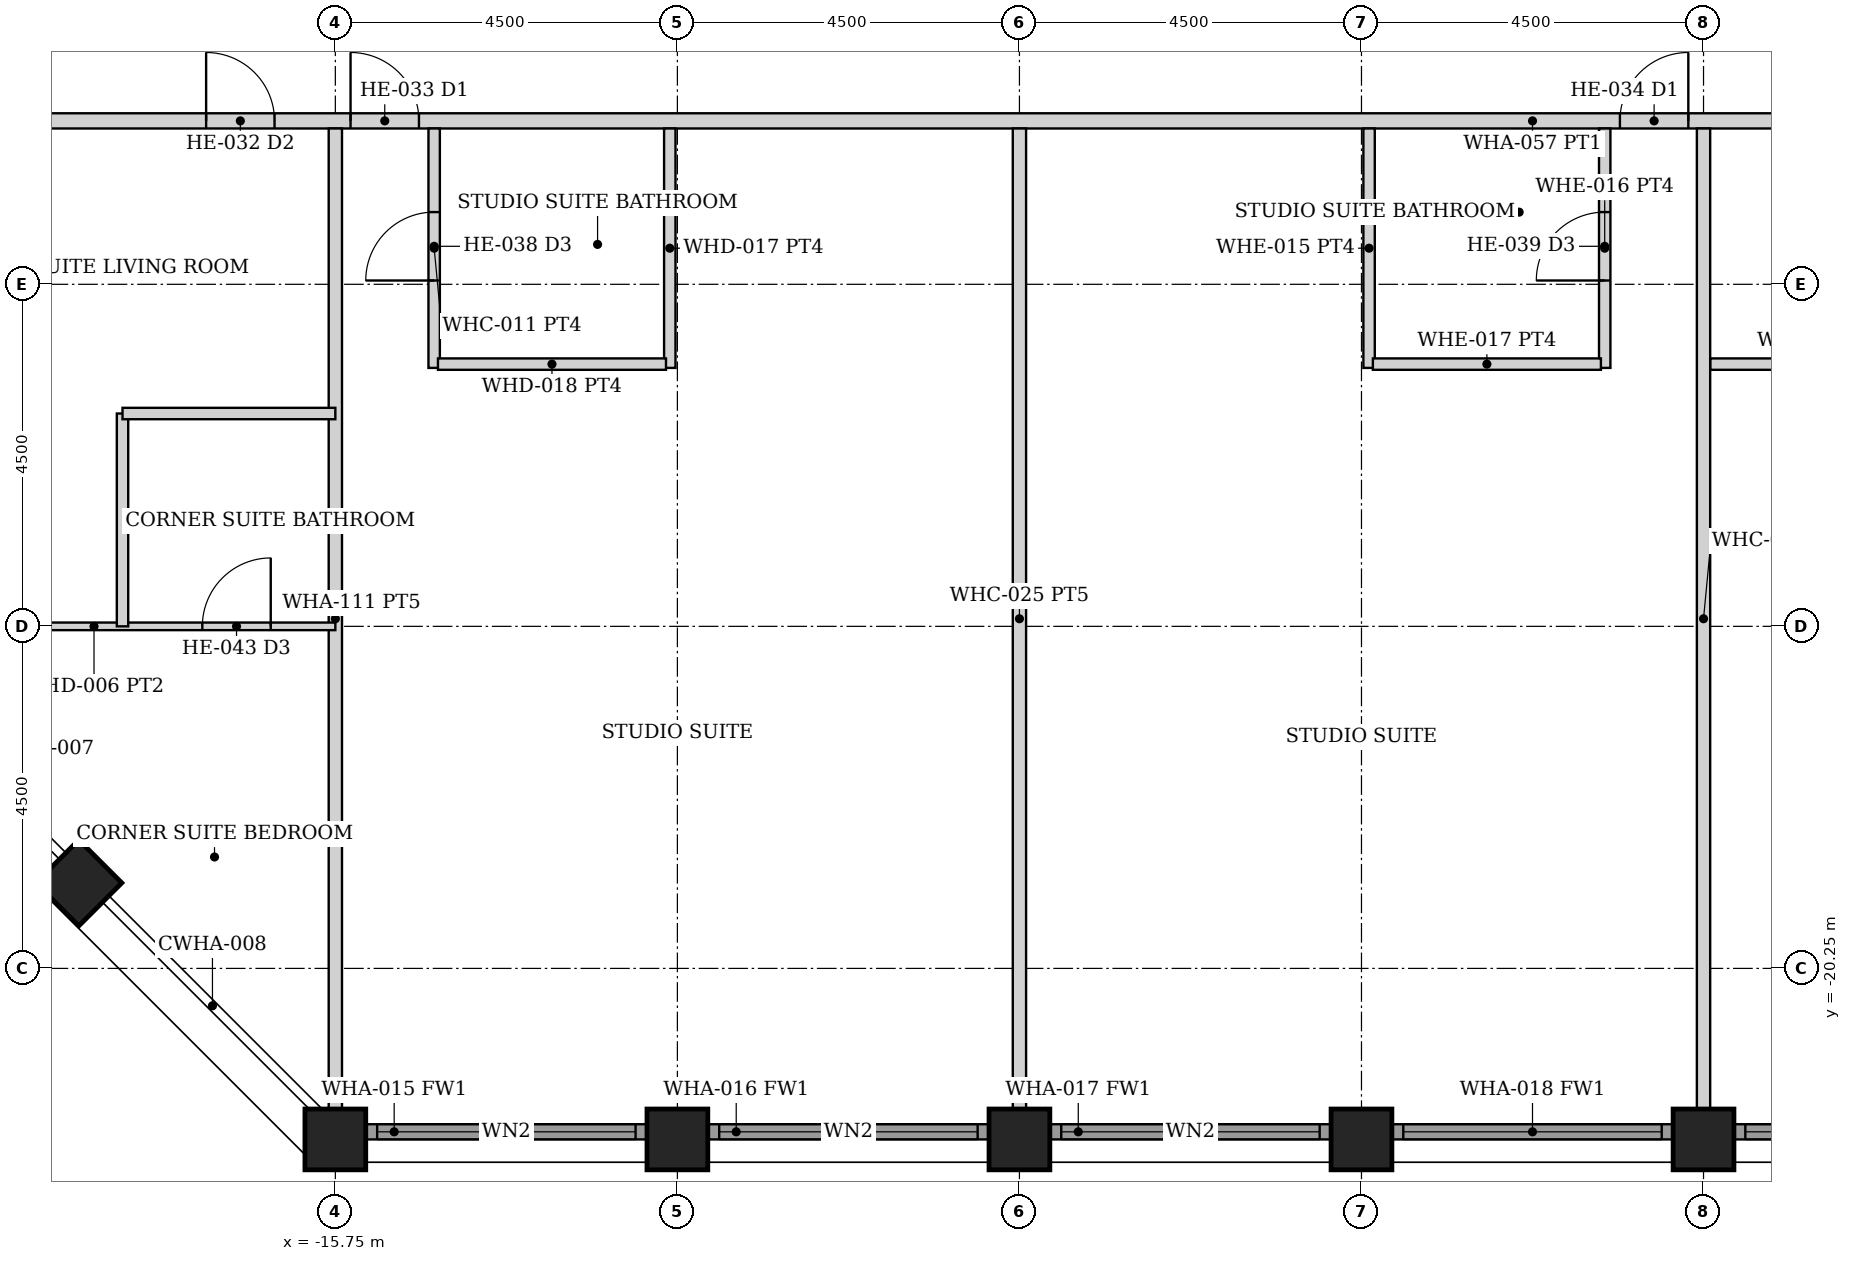
"""IFC4 building model, lengths in metres.
Left out: names, types, materials, properties, quantities, classifications, styles, units other than length and angle.
Written with IfcOpenShell. Run it as: python <this file> out.ifc"""

import sys

from ifc_helpers import new_model, si_unit, direction, frame, frame_2d, origin, origin_2d, place, context, subcontext, project, spatial, rectangle, hollow_rectangle, extrude, element, fill, save


model = new_model("IFC4")
c1 = context("Model", 3, precision=1e-05, world=origin(), true_north=direction((0.0, 1.0)))
c2 = subcontext(c1, "Body", "Model", "MODEL_VIEW")
j1 = project(units=[si_unit("LENGTHUNIT", "METRE"), si_unit("PLANEANGLEUNIT", "RADIAN")], contexts=[c1])
p1 = place(None, origin())
s1 = spatial("IfcSite", under=j1, at=p1, CompositionType="ELEMENT")
p2 = place(p1, origin())
s2 = spatial("IfcBuilding", under=s1, at=p2, CompositionType="ELEMENT")
p3 = place(p2, frame((0.0, 0.0, 161.6)))
s3 = spatial("IfcBuildingStorey", under=s2, at=p3, CompositionType="ELEMENT", Elevation=161.6)
for number, where, z_axis, x_axis in (
    (1, (-15.75, -22.5, 0.0), (0.0, 0.0, 1.0), (0.0, 1.0, 0.0)),
    (2, (-11.25, -22.5, 0.0), (0.0, 0.0, 1.0), (0.0, 1.0, 0.0)),
    (3, (-6.75, -22.5, 0.0), (0.0, 0.0, 1.0), (0.0, 1.0, 0.0)),
    (4, (-2.25, -22.5, 0.0), (0.0, 0.0, 1.0), (0.0, 1.0, 0.0)),
    (5, (2.25, -22.5, 0.0), (0.0, 0.0, 1.0), (0.0, 1.0, 0.0)),
    (6, (-19.125, -19.125, 0.0), (0.0, 0.0, 1.0), (0.707, 0.707, 0.0)),
):
    element("IfcColumn", number, at=place(p3, frame(where, z_axis=z_axis, x_axis=x_axis)), inside=s3, PredefinedType="COLUMN", context=c2, shape_type="SweptSolid", body=[
        extrude(hollow_rectangle(XDim=0.8, YDim=0.8, WallThickness=0.05, at=origin_2d()), origin(), (0.0, 0.0, 1.0), 3.6),
    ])
p4 = place(p3, frame((-15.345, -22.4, 0.0), z_axis=(0.0, 0.0, 1.0), x_axis=(1.0, 0.0, 0.0)))
e7 = element("IfcWall", 7, at=p4, inside=s3, PredefinedType="SOLIDWALL", context=c2, shape_type="SweptSolid", body=[
    extrude(rectangle(XDim=3.69, YDim=0.2, at=frame_2d((1.845, 0.0))), origin(), (0.0, 0.0, 1.0), 2.479),
])
p5 = place(p4, frame((0.145, 0.0, 0.3)))
e8 = element("IfcOpeningElement", 8, at=p5, cuts=e7, PredefinedType="OPENING", context=c2, shape_type="SweptSolid", body=[
    extrude(rectangle(XDim=3.4, YDim=2.029, at=frame_2d((1.7, 1.015))), frame((0.0, 0.11, 0.0), z_axis=(0.0, -1.0, 0.0), x_axis=(1.0, 0.0, 0.0)), (0.0, 0.0, 1.0), 0.22),
])
p6 = place(p3, frame((-10.845, -22.4, 0.0), z_axis=(0.0, 0.0, 1.0), x_axis=(1.0, 0.0, 0.0)))
e9 = element("IfcWall", 9, at=p6, inside=s3, PredefinedType="SOLIDWALL", context=c2, shape_type="SweptSolid", body=[
    extrude(rectangle(XDim=3.69, YDim=0.2, at=frame_2d((1.845, 0.0))), origin(), (0.0, 0.0, 1.0), 2.479),
])
p7 = place(p6, frame((0.145, 0.0, 0.3)))
e10 = element("IfcOpeningElement", 10, at=p7, cuts=e9, PredefinedType="OPENING", context=c2, shape_type="SweptSolid", body=[
    extrude(rectangle(XDim=3.4, YDim=2.029, at=frame_2d((1.7, 1.015))), frame((0.0, 0.11, 0.0), z_axis=(0.0, -1.0, 0.0), x_axis=(1.0, 0.0, 0.0)), (0.0, 0.0, 1.0), 0.22),
])
p8 = place(p3, frame((-6.345, -22.4, 0.0), z_axis=(0.0, 0.0, 1.0), x_axis=(1.0, 0.0, 0.0)))
e11 = element("IfcWall", 11, at=p8, inside=s3, PredefinedType="SOLIDWALL", context=c2, shape_type="SweptSolid", body=[
    extrude(rectangle(XDim=3.69, YDim=0.2, at=frame_2d((1.845, 0.0))), origin(), (0.0, 0.0, 1.0), 2.479),
])
p9 = place(p8, frame((0.145, 0.0, 0.3)))
e12 = element("IfcOpeningElement", 12, at=p9, cuts=e11, PredefinedType="OPENING", context=c2, shape_type="SweptSolid", body=[
    extrude(rectangle(XDim=3.4, YDim=2.029, at=frame_2d((1.7, 1.015))), frame((0.0, 0.11, 0.0), z_axis=(0.0, -1.0, 0.0), x_axis=(1.0, 0.0, 0.0)), (0.0, 0.0, 1.0), 0.22),
])
p10 = place(p3, frame((-1.845, -22.4, 0.0), z_axis=(0.0, 0.0, 1.0), x_axis=(1.0, 0.0, 0.0)))
e13 = element("IfcWall", 13, at=p10, inside=s3, PredefinedType="SOLIDWALL", context=c2, shape_type="SweptSolid", body=[
    extrude(rectangle(XDim=3.69, YDim=0.2, at=frame_2d((1.845, 0.0))), origin(), (0.0, 0.0, 1.0), 2.479),
])
p11 = place(p10, frame((0.145, 0.0, 0.3)))
e14 = element("IfcOpeningElement", 14, at=p11, cuts=e13, PredefinedType="OPENING", context=c2, shape_type="SweptSolid", body=[
    extrude(rectangle(XDim=3.4, YDim=2.029, at=frame_2d((1.7, 1.015))), frame((0.0, 0.11, 0.0), z_axis=(0.0, -1.0, 0.0), x_axis=(1.0, 0.0, 0.0)), (0.0, 0.0, 1.0), 0.22),
])
p12 = place(p3, frame((2.655, -22.4, 0.0), z_axis=(0.0, 0.0, 1.0), x_axis=(1.0, 0.0, 0.0)))
e15 = element("IfcWall", 15, at=p12, inside=s3, PredefinedType="SOLIDWALL", context=c2, shape_type="SweptSolid", body=[
    extrude(rectangle(XDim=3.69, YDim=0.2, at=frame_2d((1.845, 0.0))), origin(), (0.0, 0.0, 1.0), 2.479),
])
p13 = place(p12, frame((0.145, 0.0, 0.3)))
e16 = element("IfcOpeningElement", 16, at=p13, cuts=e15, PredefinedType="OPENING", context=c2, shape_type="SweptSolid", body=[
    extrude(rectangle(XDim=3.4, YDim=2.029, at=frame_2d((1.7, 1.015))), frame((0.0, 0.11, 0.0), z_axis=(0.0, -1.0, 0.0), x_axis=(1.0, 0.0, 0.0)), (0.0, 0.0, 1.0), 0.22),
])
p14 = place(p3, frame((-22.3, -9.1, 0.0), z_axis=(0.0, 0.0, 1.0), x_axis=(1.0, 0.0, 0.0)))
e17 = element("IfcWall", 17, at=p14, inside=s3, PredefinedType="PARTITIONING", context=c2, shape_type="SweptSolid", body=[
    extrude(rectangle(XDim=44.6, YDim=0.2, at=frame_2d((22.3, 0.0))), origin(), (0.0, 0.0, 1.0), 2.473),
])
p15 = place(p14, frame((6.75, 0.0, 0.0)))
e18 = element("IfcOpeningElement", 18, at=p15, cuts=e17, PredefinedType="OPENING", context=c2, shape_type="SweptSolid", body=[
    extrude(rectangle(XDim=0.9, YDim=2.1, at=frame_2d((0.45, 1.05))), frame((0.0, 0.11, 0.0), z_axis=(0.0, -1.0, 0.0), x_axis=(1.0, 0.0, 0.0)), (0.0, 0.0, 1.0), 0.22),
])
p16 = place(p14, frame((23.45, 0.0, 0.0)))
e19 = element("IfcOpeningElement", 19, at=p16, cuts=e17, PredefinedType="OPENING", context=c2, shape_type="SweptSolid", body=[
    extrude(rectangle(XDim=0.9, YDim=2.1, at=frame_2d((0.45, 1.05))), frame((0.0, 0.11, 0.0), z_axis=(0.0, -1.0, 0.0), x_axis=(1.0, 0.0, 0.0)), (0.0, 0.0, 1.0), 0.22),
])
p17 = place(p14, frame((27.95, 0.0, 0.0)))
e20 = element("IfcOpeningElement", 20, at=p17, cuts=e17, PredefinedType="OPENING", context=c2, shape_type="SweptSolid", body=[
    extrude(rectangle(XDim=0.9, YDim=2.1, at=frame_2d((0.45, 1.05))), frame((0.0, 0.11, 0.0), z_axis=(0.0, -1.0, 0.0), x_axis=(1.0, 0.0, 0.0)), (0.0, 0.0, 1.0), 0.22),
])
p18 = place(p14, frame((36.95, 0.0, 0.0)))
e21 = element("IfcOpeningElement", 21, at=p18, cuts=e17, PredefinedType="OPENING", context=c2, shape_type="SweptSolid", body=[
    extrude(rectangle(XDim=0.9, YDim=2.1, at=frame_2d((0.45, 1.05))), frame((0.0, 0.11, 0.0), z_axis=(0.0, -1.0, 0.0), x_axis=(1.0, 0.0, 0.0)), (0.0, 0.0, 1.0), 0.22),
])
p19 = place(p14, frame((38.85, 0.0, 0.0)))
e22 = element("IfcOpeningElement", 22, at=p19, cuts=e17, PredefinedType="OPENING", context=c2, shape_type="SweptSolid", body=[
    extrude(rectangle(XDim=0.9, YDim=2.1, at=frame_2d((0.45, 1.05))), frame((0.0, 0.11, 0.0), z_axis=(0.0, -1.0, 0.0), x_axis=(1.0, 0.0, 0.0)), (0.0, 0.0, 1.0), 0.22),
])
p20 = place(p14, frame((4.85, 0.0, 0.0)))
e23 = element("IfcOpeningElement", 23, at=p20, cuts=e17, PredefinedType="OPENING", context=c2, shape_type="SweptSolid", body=[
    extrude(rectangle(XDim=0.9, YDim=2.1, at=frame_2d((0.45, 1.05))), frame((0.0, 0.11, 0.0), z_axis=(0.0, -1.0, 0.0), x_axis=(1.0, 0.0, 0.0)), (0.0, 0.0, 1.0), 0.22),
])
p21 = place(p3, frame((-14.45, -12.35, 0.0), z_axis=(0.0, 0.0, 1.0), x_axis=(0.0, 1.0, 0.0)))
e24 = element("IfcWall", 24, at=p21, inside=s3, PredefinedType="PARTITIONING", context=c2, shape_type="SweptSolid", body=[
    extrude(rectangle(XDim=3.15, YDim=0.15, at=frame_2d((1.575, 0.0))), origin(), (0.0, 0.0, 1.0), 2.473),
])
p22 = place(p21, frame((1.15, 0.0, 0.0)))
e25 = element("IfcOpeningElement", 25, at=p22, cuts=e24, PredefinedType="OPENING", context=c2, shape_type="SweptSolid", body=[
    extrude(rectangle(XDim=0.9, YDim=2.1, at=frame_2d((0.45, 1.05))), frame((0.0, 0.085, 0.0), z_axis=(0.0, -1.0, 0.0), x_axis=(1.0, 0.0, 0.0)), (0.0, 0.0, 1.0), 0.17),
])
p23 = place(p3, frame((-11.35, -12.35, 0.0), z_axis=(0.0, 0.0, 1.0), x_axis=(0.0, 1.0, 0.0)))
e26 = element("IfcWall", 26, at=p23, inside=s3, PredefinedType="PARTITIONING", context=c2, shape_type="SweptSolid", body=[
    extrude(rectangle(XDim=3.15, YDim=0.15, at=frame_2d((1.575, 0.0))), origin(), (0.0, 0.0, 1.0), 2.473),
])
p24 = place(p3, frame((-14.4, -12.3, 0.0), z_axis=(0.0, 0.0, 1.0), x_axis=(1.0, 0.0, 0.0)))
e27 = element("IfcWall", 27, at=p24, inside=s3, PredefinedType="PARTITIONING", context=c2, shape_type="SweptSolid", body=[
    extrude(rectangle(XDim=3.0, YDim=0.15, at=frame_2d((1.5, 0.0))), origin(), (0.0, 0.0, 1.0), 2.473),
])
p25 = place(p3, frame((0.95, -12.35, 0.0), z_axis=(0.0, 0.0, 1.0), x_axis=(0.0, 1.0, 0.0)))
e28 = element("IfcWall", 28, at=p25, inside=s3, PredefinedType="PARTITIONING", context=c2, shape_type="SweptSolid", body=[
    extrude(rectangle(XDim=3.15, YDim=0.15, at=frame_2d((1.575, 0.0))), origin(), (0.0, 0.0, 1.0), 2.473),
])
p26 = place(p25, frame((1.15, 0.0, 0.0)))
e29 = element("IfcOpeningElement", 29, at=p26, cuts=e28, PredefinedType="OPENING", context=c2, shape_type="SweptSolid", body=[
    extrude(rectangle(XDim=0.9, YDim=2.1, at=frame_2d((0.45, 1.05))), frame((0.0, 0.085, 0.0), z_axis=(0.0, -1.0, 0.0), x_axis=(1.0, 0.0, 0.0)), (0.0, 0.0, 1.0), 0.17),
])
p27 = place(p3, frame((-2.15, -12.35, 0.0), z_axis=(0.0, 0.0, 1.0), x_axis=(0.0, 1.0, 0.0)))
e30 = element("IfcWall", 30, at=p27, inside=s3, PredefinedType="PARTITIONING", context=c2, shape_type="SweptSolid", body=[
    extrude(rectangle(XDim=3.15, YDim=0.15, at=frame_2d((1.575, 0.0))), origin(), (0.0, 0.0, 1.0), 2.473),
])
p28 = place(p3, frame((-2.1, -12.3, 0.0), z_axis=(0.0, 0.0, 1.0), x_axis=(1.0, 0.0, 0.0)))
e31 = element("IfcWall", 31, at=p28, inside=s3, PredefinedType="PARTITIONING", context=c2, shape_type="SweptSolid", body=[
    extrude(rectangle(XDim=3.0, YDim=0.15, at=frame_2d((1.5, 0.0))), origin(), (0.0, 0.0, 1.0), 2.473),
])
p29 = place(p3, frame((2.337, -12.3, 0.0), z_axis=(0.0, 0.0, 1.0), x_axis=(1.0, 0.0, 0.0)))
e32 = element("IfcWall", 32, at=p29, inside=s3, PredefinedType="PARTITIONING", context=c2, shape_type="SweptSolid", body=[
    extrude(rectangle(XDim=3.062, YDim=0.15, at=frame_2d((1.531, 0.0))), origin(), (0.0, 0.0, 1.0), 2.473),
])
for number, where, z_axis, x_axis in (
    (33, (-15.75, -22.1, 0.0), (0.0, 0.0, 1.0), (0.0, 1.0, 0.0)),
    (34, (-6.75, -22.1, 0.0), (0.0, 0.0, 1.0), (0.0, 1.0, 0.0)),
    (35, (2.25, -22.1, 0.0), (0.0, 0.0, 1.0), (0.0, 1.0, 0.0)),
):
    element("IfcWall", number, at=place(p3, frame(where, z_axis=z_axis, x_axis=x_axis)), inside=s3, PredefinedType="PARTITIONING", context=c2, shape_type="SweptSolid", body=[
        extrude(rectangle(XDim=12.9, YDim=0.175, at=frame_2d((6.45, 0.0))), origin(), (0.0, 0.0, 1.0), 2.473),
    ])
p30 = place(p3, frame((-22.1, -15.75, 0.0), z_axis=(0.0, 0.0, 1.0), x_axis=(1.0, 0.0, 0.0)))
e36 = element("IfcWall", 36, at=p30, inside=s3, PredefinedType="PARTITIONING", context=c2, shape_type="SweptSolid", body=[
    extrude(rectangle(XDim=6.35, YDim=0.1, at=frame_2d((3.175, 0.0))), origin(), (0.0, 0.0, 1.0), 2.473),
])
p31 = place(p30, frame((1.375, 0.0, 0.0)))
e37 = element("IfcOpeningElement", 37, at=p31, cuts=e36, PredefinedType="OPENING", context=c2, shape_type="SweptSolid", body=[
    extrude(rectangle(XDim=0.85, YDim=2.1, at=frame_2d((0.425, 1.05))), frame((0.0, 0.06, 0.0), z_axis=(0.0, -1.0, 0.0), x_axis=(1.0, 0.0, 0.0)), (0.0, 0.0, 1.0), 0.12),
])
p32 = place(p30, frame((4.6, 0.0, 0.0)))
e38 = element("IfcOpeningElement", 38, at=p32, cuts=e36, PredefinedType="OPENING", context=c2, shape_type="SweptSolid", body=[
    extrude(rectangle(XDim=0.9, YDim=2.1, at=frame_2d((0.45, 1.05))), frame((0.0, 0.06, 0.0), z_axis=(0.0, -1.0, 0.0), x_axis=(1.0, 0.0, 0.0)), (0.0, 0.0, 1.0), 0.12),
])
for number, where, z_axis, x_axis in (
    (39, (-18.55, -15.75, 0.0), (0.0, 0.0, 1.0), (0.0, 1.0, 0.0)),
    (40, (-18.55, -12.95, 0.0), (0.0, 0.0, 1.0), (1.0, 0.0, 0.0)),
):
    element("IfcWall", number, at=place(p3, frame(where, z_axis=z_axis, x_axis=x_axis)), inside=s3, PredefinedType="PARTITIONING", context=c2, shape_type="SweptSolid", body=[
        extrude(rectangle(XDim=2.8, YDim=0.15, at=frame_2d((1.4, 0.0))), origin(), (0.0, 0.0, 1.0), 2.473),
    ])
p33 = place(p5, origin())
e41 = element("IfcWindow", 41, at=p33, inside=s3, PartitioningType="SINGLE_PANEL", PredefinedType="WINDOW", context=c2, shape_type="SweptSolid", body=[
    extrude(rectangle(XDim=3.4, YDim=2.029, at=frame_2d((1.7, 1.015))), frame((0.0, 0.03, 0.0), z_axis=(0.0, -1.0, 0.0), x_axis=(1.0, 0.0, 0.0)), (0.0, 0.0, 1.0), 0.06),
])
fill(e8, e41)
p34 = place(p7, origin())
e42 = element("IfcWindow", 42, at=p34, inside=s3, PartitioningType="SINGLE_PANEL", PredefinedType="WINDOW", context=c2, shape_type="SweptSolid", body=[
    extrude(rectangle(XDim=3.4, YDim=2.029, at=frame_2d((1.7, 1.015))), frame((0.0, 0.03, 0.0), z_axis=(0.0, -1.0, 0.0), x_axis=(1.0, 0.0, 0.0)), (0.0, 0.0, 1.0), 0.06),
])
fill(e10, e42)
p35 = place(p9, origin())
e43 = element("IfcWindow", 43, at=p35, inside=s3, PartitioningType="SINGLE_PANEL", PredefinedType="WINDOW", context=c2, shape_type="SweptSolid", body=[
    extrude(rectangle(XDim=3.4, YDim=2.029, at=frame_2d((1.7, 1.015))), frame((0.0, 0.03, 0.0), z_axis=(0.0, -1.0, 0.0), x_axis=(1.0, 0.0, 0.0)), (0.0, 0.0, 1.0), 0.06),
])
fill(e12, e43)
p36 = place(p11, origin())
e44 = element("IfcWindow", 44, at=p36, inside=s3, PartitioningType="SINGLE_PANEL", PredefinedType="WINDOW", context=c2, shape_type="SweptSolid", body=[
    extrude(rectangle(XDim=3.4, YDim=2.029, at=frame_2d((1.7, 1.015))), frame((0.0, 0.03, 0.0), z_axis=(0.0, -1.0, 0.0), x_axis=(1.0, 0.0, 0.0)), (0.0, 0.0, 1.0), 0.06),
])
fill(e14, e44)
p37 = place(p13, origin())
e45 = element("IfcWindow", 45, at=p37, inside=s3, PartitioningType="SINGLE_PANEL", PredefinedType="WINDOW", context=c2, shape_type="SweptSolid", body=[
    extrude(rectangle(XDim=3.4, YDim=2.029, at=frame_2d((1.7, 1.015))), frame((0.0, 0.03, 0.0), z_axis=(0.0, -1.0, 0.0), x_axis=(1.0, 0.0, 0.0)), (0.0, 0.0, 1.0), 0.06),
])
fill(e16, e45)
p38 = place(p15, origin())
e46 = element("IfcDoor", 46, at=p38, inside=s3, OperationType="SINGLE_SWING_LEFT", PredefinedType="DOOR", context=c2, shape_type="SweptSolid", body=[
    extrude(rectangle(XDim=0.9, YDim=2.1, at=frame_2d((0.45, 1.05))), frame((0.0, 0.025, 0.0), z_axis=(0.0, -1.0, 0.0), x_axis=(1.0, 0.0, 0.0)), (0.0, 0.0, 1.0), 0.05),
])
fill(e18, e46)
p39 = place(p22, origin())
e47 = element("IfcDoor", 47, at=p39, inside=s3, OperationType="SINGLE_SWING_LEFT", PredefinedType="DOOR", context=c2, shape_type="SweptSolid", body=[
    extrude(rectangle(XDim=0.9, YDim=2.1, at=frame_2d((0.45, 1.05))), frame((0.0, 0.025, 0.0), z_axis=(0.0, -1.0, 0.0), x_axis=(1.0, 0.0, 0.0)), (0.0, 0.0, 1.0), 0.05),
])
fill(e25, e47)
p40 = place(p16, origin())
e48 = element("IfcDoor", 48, at=p40, inside=s3, OperationType="SINGLE_SWING_RIGHT", PredefinedType="DOOR", context=c2, shape_type="SweptSolid", body=[
    extrude(rectangle(XDim=0.9, YDim=2.1, at=frame_2d((0.45, 1.05))), frame((0.0, 0.025, 0.0), z_axis=(0.0, -1.0, 0.0), x_axis=(1.0, 0.0, 0.0)), (0.0, 0.0, 1.0), 0.05),
])
fill(e19, e48)
p41 = place(p26, origin())
e49 = element("IfcDoor", 49, at=p41, inside=s3, OperationType="SINGLE_SWING_LEFT", PredefinedType="DOOR", context=c2, shape_type="SweptSolid", body=[
    extrude(rectangle(XDim=0.9, YDim=2.1, at=frame_2d((0.45, 1.05))), frame((0.0, 0.025, 0.0), z_axis=(0.0, -1.0, 0.0), x_axis=(1.0, 0.0, 0.0)), (0.0, 0.0, 1.0), 0.05),
])
fill(e29, e49)
p42 = place(p20, origin())
e50 = element("IfcDoor", 50, at=p42, inside=s3, OperationType="SINGLE_SWING_LEFT", PredefinedType="DOOR", context=c2, shape_type="SweptSolid", body=[
    extrude(rectangle(XDim=0.9, YDim=2.1, at=frame_2d((0.45, 1.05))), frame((0.0, 0.025, 0.0), z_axis=(0.0, -1.0, 0.0), x_axis=(1.0, 0.0, 0.0)), (0.0, 0.0, 1.0), 0.05),
])
fill(e23, e50)
p43 = place(p32, origin())
e51 = element("IfcDoor", 51, at=p43, inside=s3, OperationType="SINGLE_SWING_RIGHT", PredefinedType="DOOR", context=c2, shape_type="SweptSolid", body=[
    extrude(rectangle(XDim=0.9, YDim=2.1, at=frame_2d((0.45, 1.05))), frame((0.0, 0.025, 0.0), z_axis=(0.0, -1.0, 0.0), x_axis=(1.0, 0.0, 0.0)), (0.0, 0.0, 1.0), 0.05),
])
fill(e38, e51)
save(model, sys.argv[1])
